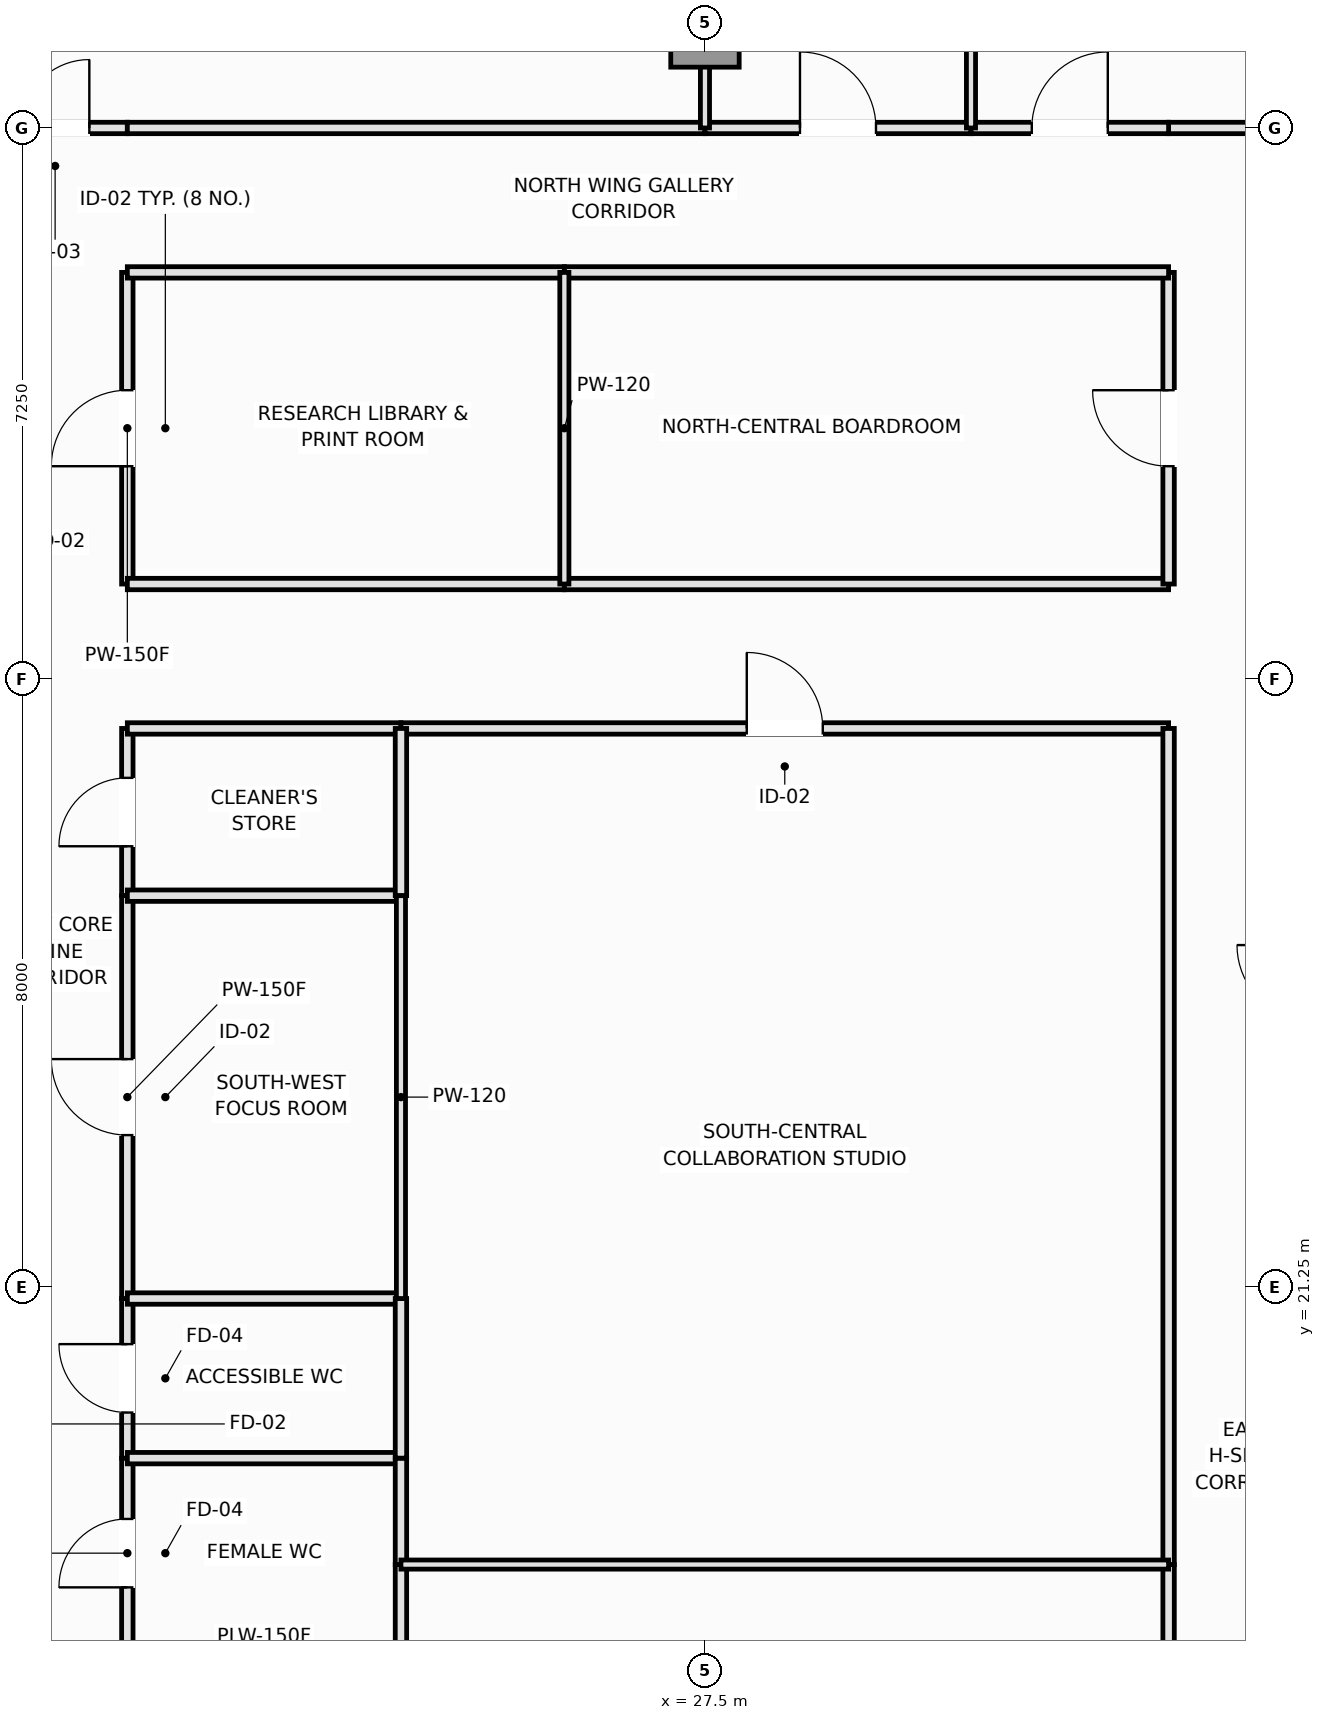
"""IFC4 building model, lengths in metres.
Left out: names, types, materials, properties, quantities, classifications, styles, units other than length and angle.
Written with IfcOpenShell. Run it as: python <this file> out.ifc"""

import sys

from ifc_helpers import new_model, si_unit, direction, frame, frame_2d, origin, origin_2d, place, context, subcontext, project, spatial, rectangle, extrude, element, fill, save


model = new_model("IFC4")
c1 = context("Model", 3, precision=1e-05, world=origin(), true_north=direction((0.0, 1.0)))
c2 = subcontext(c1, "Body", "Model", "MODEL_VIEW")
j1 = project(units=[si_unit("LENGTHUNIT", "METRE"), si_unit("PLANEANGLEUNIT", "RADIAN")], contexts=[c1])
p1 = place(None, origin())
s1 = spatial("IfcSite", under=j1, at=p1, CompositionType="ELEMENT")
p2 = place(p1, origin())
s2 = spatial("IfcBuilding", under=s1, at=p2, CompositionType="ELEMENT")
p3 = place(p2, frame((0.0, 0.0, 234.2)))
s3 = spatial("IfcBuildingStorey", under=s2, at=p3, CompositionType="ELEMENT", Elevation=234.2)
p4 = place(p3, frame((27.5, 37.75, 0.0), z_axis=(0.0, 0.0, 1.0), x_axis=(1.0, 0.0, 0.0)))
e1 = element("IfcColumn", 1, at=p4, inside=s3, PredefinedType="COLUMN", context=c2, shape_type="SweptSolid", body=[
    extrude(rectangle(XDim=0.9, YDim=0.9, at=origin_2d()), origin(), (0.0, 0.0, 1.0), 3.55),
])
p5 = place(p3, frame((19.9, 30.5, 0.0), z_axis=(0.0, 0.0, 1.0), x_axis=(0.0, 1.0, 0.0)))
e2 = element("IfcWall", 2, at=p5, inside=s3, PredefinedType="PARTITIONING", context=c2, shape_type="SweptSolid", body=[
    extrude(rectangle(XDim=4.1, YDim=0.15, at=frame_2d((2.05, 0.0))), origin(), (0.0, 0.0, 1.0), 3.37),
])
p6 = place(p5, frame((1.55, 0.0, 0.0)))
e3 = element("IfcOpeningElement", 3, at=p6, cuts=e2, PredefinedType="OPENING", context=c2, shape_type="SweptSolid", body=[
    extrude(rectangle(XDim=1.0, YDim=2.15, at=frame_2d((0.5, 1.075))), frame((0.0, 0.085, 0.0), z_axis=(0.0, -1.0, 0.0), x_axis=(1.0, 0.0, 0.0)), (0.0, 0.0, 1.0), 0.17),
])
p7 = place(p3, frame((19.9, 16.5, 0.0), z_axis=(0.0, 0.0, 1.0), x_axis=(0.0, 1.0, 0.0)))
e4 = element("IfcWall", 4, at=p7, inside=s3, PredefinedType="PLUMBINGWALL", context=c2, shape_type="SweptSolid", body=[
    extrude(rectangle(XDim=2.5, YDim=0.15, at=frame_2d((1.25, 0.0))), origin(), (0.0, 0.0, 1.0), 3.37),
])
p8 = place(p7, frame((0.8, 0.0, 0.0)))
e5 = element("IfcOpeningElement", 5, at=p8, cuts=e4, PredefinedType="OPENING", context=c2, shape_type="SweptSolid", body=[
    extrude(rectangle(XDim=0.9, YDim=2.1, at=frame_2d((0.45, 1.05))), frame((0.0, 0.085, 0.0), z_axis=(0.0, -1.0, 0.0), x_axis=(1.0, 0.0, 0.0)), (0.0, 0.0, 1.0), 0.17),
])
p9 = place(p3, frame((19.9, 19.0, 0.0), z_axis=(0.0, 0.0, 1.0), x_axis=(0.0, 1.0, 0.0)))
e6 = element("IfcWall", 6, at=p9, inside=s3, PredefinedType="PLUMBINGWALL", context=c2, shape_type="SweptSolid", body=[
    extrude(rectangle(XDim=2.1, YDim=0.15, at=frame_2d((1.05, 0.0))), origin(), (0.0, 0.0, 1.0), 3.37),
])
p10 = place(p9, frame((0.6, 0.0, 0.0)))
e7 = element("IfcOpeningElement", 7, at=p10, cuts=e6, PredefinedType="OPENING", context=c2, shape_type="SweptSolid", body=[
    extrude(rectangle(XDim=0.9, YDim=2.1, at=frame_2d((0.45, 1.05))), frame((0.0, 0.085, 0.0), z_axis=(0.0, -1.0, 0.0), x_axis=(1.0, 0.0, 0.0)), (0.0, 0.0, 1.0), 0.17),
])
p11 = place(p3, frame((19.9, 26.4, 0.0), z_axis=(0.0, 0.0, 1.0), x_axis=(0.0, 1.0, 0.0)))
e8 = element("IfcWall", 8, at=p11, inside=s3, PredefinedType="PLUMBINGWALL", context=c2, shape_type="SweptSolid", body=[
    extrude(rectangle(XDim=2.2, YDim=0.15, at=frame_2d((1.1, 0.0))), origin(), (0.0, 0.0, 1.0), 3.37),
])
p12 = place(p11, frame((0.65, 0.0, 0.0)))
e9 = element("IfcOpeningElement", 9, at=p12, cuts=e8, PredefinedType="OPENING", context=c2, shape_type="SweptSolid", body=[
    extrude(rectangle(XDim=0.9, YDim=2.1, at=frame_2d((0.45, 1.05))), frame((0.0, 0.085, 0.0), z_axis=(0.0, -1.0, 0.0), x_axis=(1.0, 0.0, 0.0)), (0.0, 0.0, 1.0), 0.17),
])
p13 = place(p3, frame((19.9, 21.1, 0.0), z_axis=(0.0, 0.0, 1.0), x_axis=(0.0, 1.0, 0.0)))
e10 = element("IfcWall", 10, at=p13, inside=s3, PredefinedType="PARTITIONING", context=c2, shape_type="SweptSolid", body=[
    extrude(rectangle(XDim=5.3, YDim=0.15, at=frame_2d((2.65, 0.0))), origin(), (0.0, 0.0, 1.0), 3.37),
])
p14 = place(p13, frame((2.15, 0.0, 0.0)))
e11 = element("IfcOpeningElement", 11, at=p14, cuts=e10, PredefinedType="OPENING", context=c2, shape_type="SweptSolid", body=[
    extrude(rectangle(XDim=1.0, YDim=2.15, at=frame_2d((0.5, 1.075))), frame((0.0, 0.085, 0.0), z_axis=(0.0, -1.0, 0.0), x_axis=(1.0, 0.0, 0.0)), (0.0, 0.0, 1.0), 0.17),
])
p15 = place(p3, frame((18.0, 36.5, 0.0), z_axis=(0.0, 0.0, 1.0), x_axis=(1.0, 0.0, 0.0)))
e12 = element("IfcWall", 12, at=p15, inside=s3, PredefinedType="PARTITIONING", context=c2, shape_type="SweptSolid", body=[
    extrude(rectangle(XDim=1.9, YDim=0.15, at=frame_2d((0.95, 0.0))), origin(), (0.0, 0.0, 1.0), 3.37),
])
p16 = place(p15, frame((0.5, 0.0, 0.0)))
e13 = element("IfcOpeningElement", 13, at=p16, cuts=e12, PredefinedType="OPENING", context=c2, shape_type="SweptSolid", body=[
    extrude(rectangle(XDim=0.9, YDim=2.1, at=frame_2d((0.45, 1.05))), frame((0.0, 0.085, 0.0), z_axis=(0.0, -1.0, 0.0), x_axis=(1.0, 0.0, 0.0)), (0.0, 0.0, 1.0), 0.17),
])
p17 = place(p3, frame((19.9, 30.5, 0.0), z_axis=(0.0, 0.0, 1.0), x_axis=(1.0, 0.0, 0.0)))
e14 = element("IfcWall", 14, at=p17, inside=s3, PredefinedType="PARTITIONING", context=c2, shape_type="SweptSolid", body=[
    extrude(rectangle(XDim=5.75, YDim=0.15, at=frame_2d((2.875, 0.0))), origin(), (0.0, 0.0, 1.0), 3.37),
])
p18 = place(p3, frame((25.65, 30.5, 0.0), z_axis=(0.0, 0.0, 1.0), x_axis=(1.0, 0.0, 0.0)))
e15 = element("IfcWall", 15, at=p18, inside=s3, PredefinedType="PARTITIONING", context=c2, shape_type="SweptSolid", body=[
    extrude(rectangle(XDim=7.95, YDim=0.15, at=frame_2d((3.975, 0.0))), origin(), (0.0, 0.0, 1.0), 3.37),
])
p19 = place(p3, frame((19.9, 28.6, 0.0), z_axis=(0.0, 0.0, 1.0), x_axis=(1.0, 0.0, 0.0)))
e16 = element("IfcWall", 16, at=p19, inside=s3, PredefinedType="PLUMBINGWALL", context=c2, shape_type="SweptSolid", body=[
    extrude(rectangle(XDim=3.6, YDim=0.15, at=frame_2d((1.8, 0.0))), origin(), (0.0, 0.0, 1.0), 3.37),
])
p20 = place(p3, frame((23.5, 28.6, 0.0), z_axis=(0.0, 0.0, 1.0), x_axis=(1.0, 0.0, 0.0)))
e17 = element("IfcWall", 17, at=p20, inside=s3, PredefinedType="PARTITIONING", context=c2, shape_type="SweptSolid", body=[
    extrude(rectangle(XDim=10.1, YDim=0.15, at=frame_2d((5.05, 0.0))), origin(), (0.0, 0.0, 1.0), 3.37),
])
p21 = place(p20, frame((4.55, 0.0, 0.0)))
e18 = element("IfcOpeningElement", 18, at=p21, cuts=e17, PredefinedType="OPENING", context=c2, shape_type="SweptSolid", body=[
    extrude(rectangle(XDim=1.0, YDim=2.15, at=frame_2d((0.5, 1.075))), frame((0.0, 0.085, 0.0), z_axis=(0.0, -1.0, 0.0), x_axis=(1.0, 0.0, 0.0)), (0.0, 0.0, 1.0), 0.17),
])
p22 = place(p3, frame((33.6, 30.5, 0.0), z_axis=(0.0, 0.0, 1.0), x_axis=(0.0, 1.0, 0.0)))
e19 = element("IfcWall", 19, at=p22, inside=s3, PredefinedType="PARTITIONING", context=c2, shape_type="SweptSolid", body=[
    extrude(rectangle(XDim=4.1, YDim=0.15, at=frame_2d((2.05, 0.0))), origin(), (0.0, 0.0, 1.0), 3.37),
])
p23 = place(p22, frame((1.55, 0.0, 0.0)))
e20 = element("IfcOpeningElement", 20, at=p23, cuts=e19, PredefinedType="OPENING", context=c2, shape_type="SweptSolid", body=[
    extrude(rectangle(XDim=1.0, YDim=2.15, at=frame_2d((0.5, 1.075))), frame((0.0, 0.085, 0.0), z_axis=(0.0, -1.0, 0.0), x_axis=(1.0, 0.0, 0.0)), (0.0, 0.0, 1.0), 0.17),
])
p24 = place(p3, frame((33.6, 14.0, 0.0), z_axis=(0.0, 0.0, 1.0), x_axis=(0.0, 1.0, 0.0)))
e21 = element("IfcWall", 21, at=p24, inside=s3, PredefinedType="PARTITIONING", context=c2, shape_type="SweptSolid", body=[
    extrude(rectangle(XDim=3.6, YDim=0.15, at=frame_2d((1.8, 0.0))), origin(), (0.0, 0.0, 1.0), 3.37),
])
p25 = place(p24, frame((1.3, 0.0, 0.0)))
e22 = element("IfcOpeningElement", 22, at=p25, cuts=e21, PredefinedType="OPENING", context=c2, shape_type="SweptSolid", body=[
    extrude(rectangle(XDim=1.0, YDim=2.15, at=frame_2d((0.5, 1.075))), frame((0.0, 0.085, 0.0), z_axis=(0.0, -1.0, 0.0), x_axis=(1.0, 0.0, 0.0)), (0.0, 0.0, 1.0), 0.17),
])
p26 = place(p3, frame((33.6, 17.6, 0.0), z_axis=(0.0, 0.0, 1.0), x_axis=(0.0, 1.0, 0.0)))
e23 = element("IfcWall", 23, at=p26, inside=s3, PredefinedType="PARTITIONING", context=c2, shape_type="SweptSolid", body=[
    extrude(rectangle(XDim=11.0, YDim=0.15, at=frame_2d((5.5, 0.0))), origin(), (0.0, 0.0, 1.0), 3.37),
])
p27 = place(p3, frame((33.6, 36.5, 0.0), z_axis=(0.0, 0.0, 1.0), x_axis=(1.0, 0.0, 0.0)))
e24 = element("IfcWall", 24, at=p27, inside=s3, PredefinedType="PARTITIONING", context=c2, shape_type="SweptSolid", body=[
    extrude(rectangle(XDim=1.9, YDim=0.15, at=frame_2d((0.95, 0.0))), origin(), (0.0, 0.0, 1.0), 3.37),
])
p28 = place(p3, frame((19.9, 34.6, 0.0), z_axis=(0.0, 0.0, 1.0), x_axis=(1.0, 0.0, 0.0)))
e25 = element("IfcWall", 25, at=p28, inside=s3, PredefinedType="PARTITIONING", context=c2, shape_type="SweptSolid", body=[
    extrude(rectangle(XDim=5.75, YDim=0.15, at=frame_2d((2.875, 0.0))), origin(), (0.0, 0.0, 1.0), 3.37),
])
p29 = place(p3, frame((25.65, 34.6, 0.0), z_axis=(0.0, 0.0, 1.0), x_axis=(1.0, 0.0, 0.0)))
e26 = element("IfcWall", 26, at=p29, inside=s3, PredefinedType="PARTITIONING", context=c2, shape_type="SweptSolid", body=[
    extrude(rectangle(XDim=7.95, YDim=0.15, at=frame_2d((3.975, 0.0))), origin(), (0.0, 0.0, 1.0), 3.37),
])
p30 = place(p3, frame((19.9, 36.5, 0.0), z_axis=(0.0, 0.0, 1.0), x_axis=(1.0, 0.0, 0.0)))
e27 = element("IfcWall", 27, at=p30, inside=s3, PredefinedType="PARTITIONING", context=c2, shape_type="SweptSolid", body=[
    extrude(rectangle(XDim=7.6, YDim=0.15, at=frame_2d((3.8, 0.0))), origin(), (0.0, 0.0, 1.0), 3.37),
])
p31 = place(p3, frame((27.5, 36.5, 0.0), z_axis=(0.0, 0.0, 1.0), x_axis=(1.0, 0.0, 0.0)))
e28 = element("IfcWall", 28, at=p31, inside=s3, PredefinedType="PARTITIONING", context=c2, shape_type="SweptSolid", body=[
    extrude(rectangle(XDim=3.5, YDim=0.15, at=frame_2d((1.75, 0.0))), origin(), (0.0, 0.0, 1.0), 3.37),
])
p32 = place(p31, frame((1.25, 0.0, 0.0)))
e29 = element("IfcOpeningElement", 29, at=p32, cuts=e28, PredefinedType="OPENING", context=c2, shape_type="SweptSolid", body=[
    extrude(rectangle(XDim=1.0, YDim=2.15, at=frame_2d((0.5, 1.075))), frame((0.0, 0.085, 0.0), z_axis=(0.0, -1.0, 0.0), x_axis=(1.0, 0.0, 0.0)), (0.0, 0.0, 1.0), 0.17),
])
p33 = place(p3, frame((31.0, 36.5, 0.0), z_axis=(0.0, 0.0, 1.0), x_axis=(1.0, 0.0, 0.0)))
e30 = element("IfcWall", 30, at=p33, inside=s3, PredefinedType="PARTITIONING", context=c2, shape_type="SweptSolid", body=[
    extrude(rectangle(XDim=2.6, YDim=0.15, at=frame_2d((1.3, 0.0))), origin(), (0.0, 0.0, 1.0), 3.37),
])
p34 = place(p33, frame((0.8, 0.0, 0.0)))
e31 = element("IfcOpeningElement", 31, at=p34, cuts=e30, PredefinedType="OPENING", context=c2, shape_type="SweptSolid", body=[
    extrude(rectangle(XDim=1.0, YDim=2.15, at=frame_2d((0.5, 1.075))), frame((0.0, 0.085, 0.0), z_axis=(0.0, -1.0, 0.0), x_axis=(1.0, 0.0, 0.0)), (0.0, 0.0, 1.0), 0.17),
])
p35 = place(p3, frame((25.65, 30.5, 0.0), z_axis=(0.0, 0.0, 1.0), x_axis=(0.0, 1.0, 0.0)))
e32 = element("IfcWall", 32, at=p35, inside=s3, PredefinedType="PARTITIONING", context=c2, shape_type="SweptSolid", body=[
    extrude(rectangle(XDim=4.1, YDim=0.12, at=frame_2d((2.05, 0.0))), origin(), (0.0, 0.0, 1.0), 3.07),
])
p36 = place(p3, frame((19.9, 19.0, 0.0), z_axis=(0.0, 0.0, 1.0), x_axis=(1.0, 0.0, 0.0)))
e33 = element("IfcWall", 33, at=p36, inside=s3, PredefinedType="PLUMBINGWALL", context=c2, shape_type="SweptSolid", body=[
    extrude(rectangle(XDim=3.6, YDim=0.15, at=frame_2d((1.8, 0.0))), origin(), (0.0, 0.0, 1.0), 3.37),
])
p37 = place(p3, frame((23.5, 16.5, 0.0), z_axis=(0.0, 0.0, 1.0), x_axis=(0.0, 1.0, 0.0)))
e34 = element("IfcWall", 34, at=p37, inside=s3, PredefinedType="PLUMBINGWALL", context=c2, shape_type="SweptSolid", body=[
    extrude(rectangle(XDim=1.1, YDim=0.15, at=frame_2d((0.55, 0.0))), origin(), (0.0, 0.0, 1.0), 3.37),
])
p38 = place(p3, frame((23.5, 17.6, 0.0), z_axis=(0.0, 0.0, 1.0), x_axis=(0.0, 1.0, 0.0)))
e35 = element("IfcWall", 35, at=p38, inside=s3, PredefinedType="PLUMBINGWALL", context=c2, shape_type="SweptSolid", body=[
    extrude(rectangle(XDim=1.4, YDim=0.15, at=frame_2d((0.7, 0.0))), origin(), (0.0, 0.0, 1.0), 3.37),
])
p39 = place(p3, frame((19.9, 21.1, 0.0), z_axis=(0.0, 0.0, 1.0), x_axis=(1.0, 0.0, 0.0)))
e36 = element("IfcWall", 36, at=p39, inside=s3, PredefinedType="PLUMBINGWALL", context=c2, shape_type="SweptSolid", body=[
    extrude(rectangle(XDim=3.6, YDim=0.15, at=frame_2d((1.8, 0.0))), origin(), (0.0, 0.0, 1.0), 3.37),
])
p40 = place(p3, frame((23.5, 19.0, 0.0), z_axis=(0.0, 0.0, 1.0), x_axis=(0.0, 1.0, 0.0)))
e37 = element("IfcWall", 37, at=p40, inside=s3, PredefinedType="PLUMBINGWALL", context=c2, shape_type="SweptSolid", body=[
    extrude(rectangle(XDim=2.1, YDim=0.15, at=frame_2d((1.05, 0.0))), origin(), (0.0, 0.0, 1.0), 3.37),
])
p41 = place(p3, frame((19.9, 26.4, 0.0), z_axis=(0.0, 0.0, 1.0), x_axis=(1.0, 0.0, 0.0)))
e38 = element("IfcWall", 38, at=p41, inside=s3, PredefinedType="PLUMBINGWALL", context=c2, shape_type="SweptSolid", body=[
    extrude(rectangle(XDim=3.6, YDim=0.15, at=frame_2d((1.8, 0.0))), origin(), (0.0, 0.0, 1.0), 3.37),
])
p42 = place(p3, frame((23.5, 26.4, 0.0), z_axis=(0.0, 0.0, 1.0), x_axis=(0.0, 1.0, 0.0)))
e39 = element("IfcWall", 39, at=p42, inside=s3, PredefinedType="PLUMBINGWALL", context=c2, shape_type="SweptSolid", body=[
    extrude(rectangle(XDim=2.2, YDim=0.15, at=frame_2d((1.1, 0.0))), origin(), (0.0, 0.0, 1.0), 3.37),
])
p43 = place(p3, frame((23.5, 21.1, 0.0), z_axis=(0.0, 0.0, 1.0), x_axis=(0.0, 1.0, 0.0)))
e40 = element("IfcWall", 40, at=p43, inside=s3, PredefinedType="PARTITIONING", context=c2, shape_type="SweptSolid", body=[
    extrude(rectangle(XDim=5.3, YDim=0.12, at=frame_2d((2.65, 0.0))), origin(), (0.0, 0.0, 1.0), 3.37),
])
p44 = place(p3, frame((23.5, 17.6, 0.0), z_axis=(0.0, 0.0, 1.0), x_axis=(1.0, 0.0, 0.0)))
e41 = element("IfcWall", 41, at=p44, inside=s3, PredefinedType="PARTITIONING", context=c2, shape_type="SweptSolid", body=[
    extrude(rectangle(XDim=10.1, YDim=0.12, at=frame_2d((5.05, 0.0))), origin(), (0.0, 0.0, 1.0), 3.37),
])
p45 = place(p3, frame((27.5, 36.5, 0.0), z_axis=(0.0, 0.0, 1.0), x_axis=(0.0, 1.0, 0.0)))
e42 = element("IfcWall", 42, at=p45, inside=s3, PredefinedType="PARTITIONING", context=c2, shape_type="SweptSolid", body=[
    extrude(rectangle(XDim=8.99, YDim=0.12, at=frame_2d((4.495, 0.0))), origin(), (0.0, 0.0, 1.0), 2.92),
])
p46 = place(p3, frame((31.0, 36.5, 0.0), z_axis=(0.0, 0.0, 1.0), x_axis=(0.0, 1.0, 0.0)))
e43 = element("IfcWall", 43, at=p46, inside=s3, PredefinedType="PARTITIONING", context=c2, shape_type="SweptSolid", body=[
    extrude(rectangle(XDim=8.99, YDim=0.12, at=frame_2d((4.495, 0.0))), origin(), (0.0, 0.0, 1.0), 3.37),
])
p47 = place(p6, origin())
e44 = element("IfcDoor", 44, at=p47, inside=s3, OperationType="SINGLE_SWING_LEFT", PredefinedType="DOOR", context=c2, shape_type="SweptSolid", body=[
    extrude(rectangle(XDim=1.0, YDim=2.15, at=frame_2d((0.5, 1.075))), frame((0.0, 0.025, 0.0), z_axis=(0.0, -1.0, 0.0), x_axis=(1.0, 0.0, 0.0)), (0.0, 0.0, 1.0), 0.05),
])
fill(e3, e44)
p48 = place(p8, origin())
e45 = element("IfcDoor", 45, at=p48, inside=s3, OperationType="SINGLE_SWING_LEFT", PredefinedType="DOOR", context=c2, shape_type="SweptSolid", body=[
    extrude(rectangle(XDim=0.9, YDim=2.1, at=frame_2d((0.45, 1.05))), frame((0.0, 0.025, 0.0), z_axis=(0.0, -1.0, 0.0), x_axis=(1.0, 0.0, 0.0)), (0.0, 0.0, 1.0), 0.05),
])
fill(e5, e45)
p49 = place(p10, origin())
e46 = element("IfcDoor", 46, at=p49, inside=s3, OperationType="SINGLE_SWING_RIGHT", PredefinedType="DOOR", context=c2, shape_type="SweptSolid", body=[
    extrude(rectangle(XDim=0.9, YDim=2.1, at=frame_2d((0.45, 1.05))), frame((0.0, 0.025, 0.0), z_axis=(0.0, -1.0, 0.0), x_axis=(1.0, 0.0, 0.0)), (0.0, 0.0, 1.0), 0.05),
])
fill(e7, e46)
p50 = place(p12, origin())
e47 = element("IfcDoor", 47, at=p50, inside=s3, OperationType="SINGLE_SWING_LEFT", PredefinedType="DOOR", context=c2, shape_type="SweptSolid", body=[
    extrude(rectangle(XDim=0.9, YDim=2.1, at=frame_2d((0.45, 1.05))), frame((0.0, 0.025, 0.0), z_axis=(0.0, -1.0, 0.0), x_axis=(1.0, 0.0, 0.0)), (0.0, 0.0, 1.0), 0.05),
])
fill(e9, e47)
p51 = place(p14, origin())
e48 = element("IfcDoor", 48, at=p51, inside=s3, OperationType="SINGLE_SWING_RIGHT", PredefinedType="DOOR", context=c2, shape_type="SweptSolid", body=[
    extrude(rectangle(XDim=1.0, YDim=2.15, at=frame_2d((0.5, 1.075))), frame((0.0, 0.025, 0.0), z_axis=(0.0, -1.0, 0.0), x_axis=(1.0, 0.0, 0.0)), (0.0, 0.0, 1.0), 0.05),
])
fill(e11, e48)
p52 = place(p16, origin())
e49 = element("IfcDoor", 49, at=p52, inside=s3, OperationType="SINGLE_SWING_RIGHT", PredefinedType="DOOR", context=c2, shape_type="SweptSolid", body=[
    extrude(rectangle(XDim=0.9, YDim=2.1, at=frame_2d((0.45, 1.05))), frame((0.0, 0.025, 0.0), z_axis=(0.0, -1.0, 0.0), x_axis=(1.0, 0.0, 0.0)), (0.0, 0.0, 1.0), 0.05),
])
fill(e13, e49)
p53 = place(p21, origin())
e50 = element("IfcDoor", 50, at=p53, inside=s3, OperationType="SINGLE_SWING_LEFT", PredefinedType="DOOR", context=c2, shape_type="SweptSolid", body=[
    extrude(rectangle(XDim=1.0, YDim=2.15, at=frame_2d((0.5, 1.075))), frame((0.0, 0.025, 0.0), z_axis=(0.0, -1.0, 0.0), x_axis=(1.0, 0.0, 0.0)), (0.0, 0.0, 1.0), 0.05),
])
fill(e18, e50)
p54 = place(p23, origin())
e51 = element("IfcDoor", 51, at=p54, inside=s3, OperationType="SINGLE_SWING_RIGHT", PredefinedType="DOOR", context=c2, shape_type="SweptSolid", body=[
    extrude(rectangle(XDim=1.0, YDim=2.15, at=frame_2d((0.5, 1.075))), frame((0.0, 0.025, 0.0), z_axis=(0.0, -1.0, 0.0), x_axis=(1.0, 0.0, 0.0)), (0.0, 0.0, 1.0), 0.05),
])
fill(e20, e51)
p55 = place(p32, origin())
e52 = element("IfcDoor", 52, at=p55, inside=s3, OperationType="SINGLE_SWING_LEFT", PredefinedType="DOOR", context=c2, shape_type="SweptSolid", body=[
    extrude(rectangle(XDim=1.0, YDim=2.15, at=frame_2d((0.5, 1.075))), frame((0.0, 0.025, 0.0), z_axis=(0.0, -1.0, 0.0), x_axis=(1.0, 0.0, 0.0)), (0.0, 0.0, 1.0), 0.05),
])
fill(e29, e52)
p56 = place(p34, origin())
e53 = element("IfcDoor", 53, at=p56, inside=s3, OperationType="SINGLE_SWING_RIGHT", PredefinedType="DOOR", context=c2, shape_type="SweptSolid", body=[
    extrude(rectangle(XDim=1.0, YDim=2.15, at=frame_2d((0.5, 1.075))), frame((0.0, 0.025, 0.0), z_axis=(0.0, -1.0, 0.0), x_axis=(1.0, 0.0, 0.0)), (0.0, 0.0, 1.0), 0.05),
])
fill(e31, e53)
save(model, sys.argv[1])
